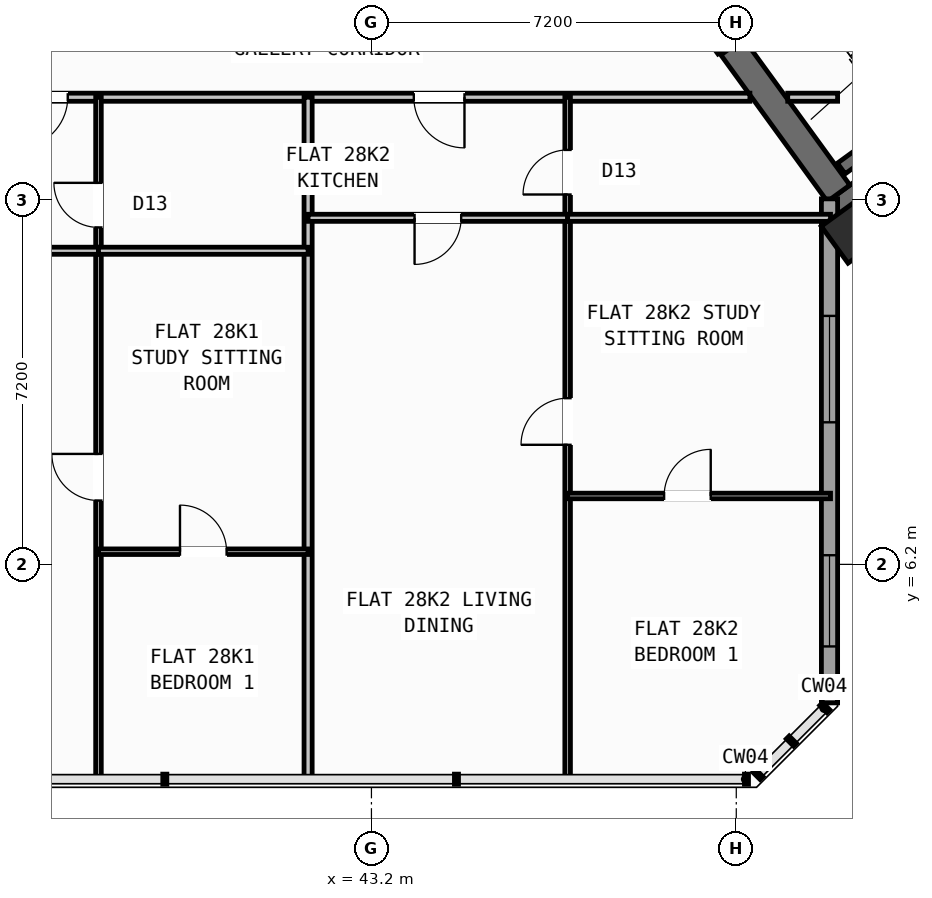
"""IFC4 building model, lengths in metres.
Left out: names, types, materials, properties, quantities, classifications, styles, units other than length and angle.
Written with IfcOpenShell. Run it as: python <this file> out.ifc"""

import sys

from ifc_helpers import new_model, si_unit, direction, frame, frame_2d, origin, origin_2d, place, context, subcontext, project, spatial, rectangle, hollow_rectangle, extrude, source, transform, mapped, element, fill, save


model = new_model("IFC4")
c1 = context("Model", 3, precision=1e-05, world=origin(), true_north=direction((0.0, 1.0)))
c2 = subcontext(c1, "Body", "Model", "MODEL_VIEW")
j1 = project(units=[si_unit("LENGTHUNIT", "METRE"), si_unit("PLANEANGLEUNIT", "RADIAN")], contexts=[c1])
p1 = place(None, origin())
s1 = spatial("IfcSite", under=j1, at=p1, CompositionType="ELEMENT")
p2 = place(p1, origin())
s2 = spatial("IfcBuilding", under=s1, at=p2, CompositionType="ELEMENT")
p3 = place(p2, frame((0.0, 0.0, 112.5)))
s3 = spatial("IfcBuildingStorey", under=s2, at=p3, CompositionType="ELEMENT", Elevation=112.5)
p4 = place(p3, frame((36.683, 18.304, 0.0), z_axis=(0.0, 0.0, 1.0), x_axis=(-0.529896466841, -0.848062341122, 0.0)))
e1 = element("IfcWall", 1, at=p4, inside=s3, PredefinedType="SHEAR", context=c2, shape_type="SweptSolid", body=[
    extrude(rectangle(XDim=6.425, YDim=0.55, at=frame_2d((3.212, 0.0))), origin(), (0.0, 0.0, 1.0), 3.35),
])
p5 = place(p3, frame((52.359, 13.14, 0.0), z_axis=(0.0, 0.0, 1.0), x_axis=(0.809014896919, 0.587788139183, 0.0)))
e2 = element("IfcWall", 2, at=p5, inside=s3, PredefinedType="SHEAR", context=c2, shape_type="SweptSolid", body=[
    extrude(rectangle(XDim=12.34, YDim=0.55, at=frame_2d((6.17, 0.0))), origin(), (0.0, 0.0, 1.0), 3.35),
])
p6 = place(p3, frame((52.42, 13.524, 0.0), z_axis=(0.0, 0.0, 1.0), x_axis=(-0.587802113096, 0.809004744015, 0.0)))
e3 = element("IfcWall", 3, at=p6, inside=s3, PredefinedType="SHEAR", context=c2, shape_type="SweptSolid", body=[
    extrude(rectangle(XDim=3.575, YDim=0.55, at=frame_2d((1.788, 0.0))), origin(), (0.0, 0.0, 1.0), 3.35),
])
m1 = source(origin(), c2, "Body", "SweptSolid", [
    extrude(hollow_rectangle(XDim=0.9, YDim=0.9, WallThickness=0.036, at=origin_2d()), origin(), (0.0, 0.0, 1.0), 3.6),
])
p7 = place(p3, frame((52.705, 12.773, 0.0), z_axis=(0.0, 0.0, 1.0), x_axis=(0.809016994375, 0.587785252292, 0.0)))
e4 = element("IfcColumn", 4, at=p7, inside=s3, PredefinedType="COLUMN", context=c2, shape_type="MappedRepresentation", body=[
    mapped(m1, transform((0.0, 0.0, 0.0), scale=1.0)),
])
p8 = place(p3, frame((52.24, 13.414, 0.0), z_axis=(0.0, 0.0, 1.0), x_axis=(0.0, -1.0, 0.0)))
e5 = element("IfcWall", 5, at=p8, inside=s3, PredefinedType="STANDARD", context=c2, shape_type="SweptSolid", body=[
    extrude(rectangle(XDim=9.948, YDim=0.32, at=frame_2d((4.974, 0.0))), origin(), (0.0, 0.0, 1.0), 3.35),
])
p9 = place(p8, frame((2.31, 0.0, 0.8)))
e6 = element("IfcOpeningElement", 6, at=p9, cuts=e5, PredefinedType="OPENING", context=c2, shape_type="SweptSolid", body=[
    extrude(rectangle(XDim=2.1, YDim=1.55, at=frame_2d((1.05, 0.775))), frame((0.0, 0.17, 0.0), z_axis=(0.0, -1.0, 0.0), x_axis=(1.0, 0.0, 0.0)), (0.0, 0.0, 1.0), 0.34),
])
p10 = place(p8, frame((7.033, 0.0, 0.85)))
e7 = element("IfcOpeningElement", 7, at=p10, cuts=e5, PredefinedType="OPENING", context=c2, shape_type="SweptSolid", body=[
    extrude(rectangle(XDim=1.8, YDim=1.5, at=frame_2d((0.9, 0.75))), frame((0.0, 0.17, 0.0), z_axis=(0.0, -1.0, 0.0), x_axis=(1.0, 0.0, 0.0)), (0.0, 0.0, 1.0), 0.34),
])
p11 = place(p3, frame((52.472, 14.013, 0.0), z_axis=(0.0, 0.0, 1.0), x_axis=(0.809028366311, 0.587769599847, 0.0)))
e8 = element("IfcWall", 8, at=p11, inside=s3, PredefinedType="SHEAR", context=c2, shape_type="SweptSolid", body=[
    extrude(rectangle(XDim=7.33, YDim=0.26, at=frame_2d((3.665, 0.0))), origin(), (0.0, 0.0, 1.0), 3.35),
])
p12 = place(p3, frame((35.237, 15.42, 0.0), z_axis=(0.0, 0.0, 1.0), x_axis=(1.0, 0.0, 0.0)))
e9 = element("IfcWall", 9, at=p12, inside=s3, PredefinedType="PARTITIONING", context=c2, shape_type="SweptSolid", body=[
    extrude(rectangle(XDim=15.432, YDim=0.16, at=frame_2d((7.716, 0.0))), origin(), (0.0, 0.0, 1.0), 3.34),
])
p13 = place(p12, frame((0.969, 0.0, 0.0)))
e10 = element("IfcOpeningElement", 10, at=p13, cuts=e9, PredefinedType="OPENING", context=c2, shape_type="SweptSolid", body=[
    extrude(rectangle(XDim=1.0, YDim=2.1, at=frame_2d((0.5, 1.05))), frame((0.0, 0.09, 0.0), z_axis=(0.0, -1.0, 0.0), x_axis=(1.0, 0.0, 0.0)), (0.0, 0.0, 1.0), 0.18),
])
p14 = place(p12, frame((8.799, 0.0, 0.0)))
e11 = element("IfcOpeningElement", 11, at=p14, cuts=e9, PredefinedType="OPENING", context=c2, shape_type="SweptSolid", body=[
    extrude(rectangle(XDim=1.0, YDim=2.1, at=frame_2d((0.5, 1.05))), frame((0.0, 0.09, 0.0), z_axis=(0.0, -1.0, 0.0), x_axis=(1.0, 0.0, 0.0)), (0.0, 0.0, 1.0), 0.18),
])
p15 = place(p3, frame((51.416, 15.42, 0.0), z_axis=(0.0, 0.0, 1.0), x_axis=(1.0, 0.0, 0.0)))
e12 = element("IfcWall", 12, at=p15, inside=s3, PredefinedType="PARTITIONING", context=c2, shape_type="SweptSolid", body=[
    extrude(rectangle(XDim=0.984, YDim=0.16, at=frame_2d((0.492, 0.0))), origin(), (0.0, 0.0, 1.0), 3.34),
])
p16 = place(p3, frame((50.119, 16.333, 0.0), z_axis=(0.0, 0.0, 1.0), x_axis=(-0.587749856981, 0.809042709391, 0.0)))
e13 = element("IfcWall", 13, at=p16, inside=s3, PredefinedType="STANDARD", context=c2, shape_type="SweptSolid", body=[
    extrude(rectangle(XDim=2.96, YDim=0.2, at=frame_2d((1.48, 0.0))), origin(), (0.0, 0.0, 1.0), 3.34),
])
p17 = place(p16, frame((0.53, 0.0, 0.0)))
e14 = element("IfcOpeningElement", 14, at=p17, cuts=e13, PredefinedType="OPENING", context=c2, shape_type="SweptSolid", body=[
    extrude(rectangle(XDim=1.5, YDim=2.15, at=frame_2d((0.75, 1.075))), frame((0.0, 0.11, 0.0), z_axis=(0.0, -1.0, 0.0), x_axis=(1.0, 0.0, 0.0)), (0.0, 0.0, 1.0), 0.22),
])
p18 = place(p3, frame((41.95, 1.96, 0.0), z_axis=(0.0, 0.0, 1.0), x_axis=(0.0, 1.0, 0.0)))
e15 = element("IfcWall", 15, at=p18, inside=s3, PredefinedType="PARTITIONING", context=c2, shape_type="SweptSolid", body=[
    extrude(rectangle(XDim=13.46, YDim=0.16, at=frame_2d((6.73, 0.0))), origin(), (0.0, 0.0, 1.0), 3.34),
])
p19 = place(p3, frame((37.813, 1.96, 0.0), z_axis=(0.0, 0.0, 1.0), x_axis=(0.0, 1.0, 0.0)))
e16 = element("IfcWall", 16, at=p19, inside=s3, PredefinedType="PARTITIONING", context=c2, shape_type="SweptSolid", body=[
    extrude(rectangle(XDim=13.46, YDim=0.11, at=frame_2d((6.73, 0.0))), origin(), (0.0, 0.0, 1.0), 3.34),
])
p20 = place(p19, frame((5.5, 0.0, 0.0)))
e17 = element("IfcOpeningElement", 17, at=p20, cuts=e16, PredefinedType="OPENING", context=c2, shape_type="SweptSolid", body=[
    extrude(rectangle(XDim=0.92, YDim=2.08, at=frame_2d((0.46, 1.04))), frame((0.0, 0.065, 0.0), z_axis=(0.0, -1.0, 0.0), x_axis=(1.0, 0.0, 0.0)), (0.0, 0.0, 1.0), 0.13),
])
p21 = place(p19, frame((10.89, 0.0, 0.0)))
e18 = element("IfcOpeningElement", 18, at=p21, cuts=e16, PredefinedType="OPENING", context=c2, shape_type="SweptSolid", body=[
    extrude(rectangle(XDim=0.88, YDim=2.08, at=frame_2d((0.44, 1.04))), frame((0.0, 0.065, 0.0), z_axis=(0.0, -1.0, 0.0), x_axis=(1.0, 0.0, 0.0)), (0.0, 0.0, 1.0), 0.13),
])
p22 = place(p3, frame((33.433, 12.39, 0.0), z_axis=(0.0, 0.0, 1.0), x_axis=(1.0, 0.0, 0.0)))
e19 = element("IfcWall", 19, at=p22, inside=s3, PredefinedType="PLUMBINGWALL", context=c2, shape_type="SweptSolid", body=[
    extrude(rectangle(XDim=4.38, YDim=0.14, at=frame_2d((2.19, 0.0))), origin(), (0.0, 0.0, 1.0), 2.525),
])
p23 = place(p22, frame((1.064, 0.0, 0.0)))
e20 = element("IfcOpeningElement", 20, at=p23, cuts=e19, PredefinedType="OPENING", context=c2, shape_type="SweptSolid", body=[
    extrude(rectangle(XDim=0.92, YDim=2.08, at=frame_2d((0.46, 1.04))), frame((0.0, 0.08, 0.0), z_axis=(0.0, -1.0, 0.0), x_axis=(1.0, 0.0, 0.0)), (0.0, 0.0, 1.0), 0.16),
])
p24 = place(p3, frame((37.813, 12.39, 0.0), z_axis=(0.0, 0.0, 1.0), x_axis=(1.0, 0.0, 0.0)))
e21 = element("IfcWall", 21, at=p24, inside=s3, PredefinedType="PLUMBINGWALL", context=c2, shape_type="SweptSolid", body=[
    extrude(rectangle(XDim=4.137, YDim=0.14, at=frame_2d((2.068, 0.0))), origin(), (0.0, 0.0, 1.0), 2.525),
])
p25 = place(p3, frame((37.813, 6.45, 0.0), z_axis=(0.0, 0.0, 1.0), x_axis=(1.0, 0.0, 0.0)))
e22 = element("IfcWall", 22, at=p25, inside=s3, PredefinedType="PARTITIONING", context=c2, shape_type="SweptSolid", body=[
    extrude(rectangle(XDim=4.137, YDim=0.11, at=frame_2d((2.068, 0.0))), origin(), (0.0, 0.0, 1.0), 3.34),
])
p26 = place(p25, frame((1.608, 0.0, 0.0)))
e23 = element("IfcOpeningElement", 23, at=p26, cuts=e22, PredefinedType="OPENING", context=c2, shape_type="SweptSolid", body=[
    extrude(rectangle(XDim=0.92, YDim=2.08, at=frame_2d((0.46, 1.04))), frame((0.0, 0.065, 0.0), z_axis=(0.0, -1.0, 0.0), x_axis=(1.0, 0.0, 0.0)), (0.0, 0.0, 1.0), 0.13),
])
p27 = place(p3, frame((47.072, 1.96, 0.0), z_axis=(0.0, 0.0, 1.0), x_axis=(0.0, 1.0, 0.0)))
e24 = element("IfcWall", 24, at=p27, inside=s3, PredefinedType="PARTITIONING", context=c2, shape_type="SweptSolid", body=[
    extrude(rectangle(XDim=13.46, YDim=0.11, at=frame_2d((6.73, 0.0))), origin(), (0.0, 0.0, 1.0), 3.34),
])
p28 = place(p27, frame((6.6, 0.0, 0.0)))
e25 = element("IfcOpeningElement", 25, at=p28, cuts=e24, PredefinedType="OPENING", context=c2, shape_type="SweptSolid", body=[
    extrude(rectangle(XDim=0.92, YDim=2.08, at=frame_2d((0.46, 1.04))), frame((0.0, 0.065, 0.0), z_axis=(0.0, -1.0, 0.0), x_axis=(1.0, 0.0, 0.0)), (0.0, 0.0, 1.0), 0.13),
])
p29 = place(p27, frame((11.54, 0.0, 0.0)))
e26 = element("IfcOpeningElement", 26, at=p29, cuts=e24, PredefinedType="OPENING", context=c2, shape_type="SweptSolid", body=[
    extrude(rectangle(XDim=0.88, YDim=2.08, at=frame_2d((0.44, 1.04))), frame((0.0, 0.065, 0.0), z_axis=(0.0, -1.0, 0.0), x_axis=(1.0, 0.0, 0.0)), (0.0, 0.0, 1.0), 0.13),
])
p30 = place(p3, frame((41.95, 13.04, 0.0), z_axis=(0.0, 0.0, 1.0), x_axis=(1.0, 0.0, 0.0)))
e27 = element("IfcWall", 27, at=p30, inside=s3, PredefinedType="PLUMBINGWALL", context=c2, shape_type="SweptSolid", body=[
    extrude(rectangle(XDim=5.122, YDim=0.14, at=frame_2d((2.561, 0.0))), origin(), (0.0, 0.0, 1.0), 3.34),
])
p31 = place(p30, frame((2.101, 0.0, 0.0)))
e28 = element("IfcOpeningElement", 28, at=p31, cuts=e27, PredefinedType="OPENING", context=c2, shape_type="SweptSolid", body=[
    extrude(rectangle(XDim=0.92, YDim=2.08, at=frame_2d((0.46, 1.04))), frame((0.0, 0.08, 0.0), z_axis=(0.0, -1.0, 0.0), x_axis=(1.0, 0.0, 0.0)), (0.0, 0.0, 1.0), 0.16),
])
p32 = place(p3, frame((47.072, 13.04, 0.0), z_axis=(0.0, 0.0, 1.0), x_axis=(1.0, 0.0, 0.0)))
e29 = element("IfcWall", 29, at=p32, inside=s3, PredefinedType="PLUMBINGWALL", context=c2, shape_type="SweptSolid", body=[
    extrude(rectangle(XDim=5.188, YDim=0.14, at=frame_2d((2.594, 0.0))), origin(), (0.0, 0.0, 1.0), 2.525),
])
p33 = place(p3, frame((47.072, 7.55, 0.0), z_axis=(0.0, 0.0, 1.0), x_axis=(1.0, 0.0, 0.0)))
e30 = element("IfcWall", 30, at=p33, inside=s3, PredefinedType="PARTITIONING", context=c2, shape_type="SweptSolid", body=[
    extrude(rectangle(XDim=5.188, YDim=0.11, at=frame_2d((2.594, 0.0))), origin(), (0.0, 0.0, 1.0), 3.34),
])
p34 = place(p33, frame((1.904, 0.0, 0.0)))
e31 = element("IfcOpeningElement", 31, at=p34, cuts=e30, PredefinedType="OPENING", context=c2, shape_type="SweptSolid", body=[
    extrude(rectangle(XDim=0.92, YDim=2.08, at=frame_2d((0.46, 1.04))), frame((0.0, 0.065, 0.0), z_axis=(0.0, -1.0, 0.0), x_axis=(1.0, 0.0, 0.0)), (0.0, 0.0, 1.0), 0.13),
])
m2 = source(origin(), c2, "Body", "SweptSolid", [
    extrude(rectangle(XDim=2.1, YDim=1.55, at=frame_2d((1.05, 0.775))), frame((0.0, 0.03, 0.0), z_axis=(0.0, -1.0, 0.0), x_axis=(1.0, 0.0, 0.0)), (0.0, 0.0, 1.0), 0.06),
])
p35 = place(p9, origin())
e32 = element("IfcWindow", 32, at=p35, inside=s3, PartitioningType="SINGLE_PANEL", PredefinedType="WINDOW", context=c2, shape_type="MappedRepresentation", body=[
    mapped(m2, transform((0.0, 0.0, 0.0), scale=1.0)),
])
fill(e6, e32)
m3 = source(origin(), c2, "Body", "SweptSolid", [
    extrude(rectangle(XDim=1.8, YDim=1.5, at=frame_2d((0.9, 0.75))), frame((0.0, 0.03, 0.0), z_axis=(0.0, -1.0, 0.0), x_axis=(1.0, 0.0, 0.0)), (0.0, 0.0, 1.0), 0.06),
])
p36 = place(p10, origin())
e33 = element("IfcWindow", 33, at=p36, inside=s3, PartitioningType="SINGLE_PANEL", PredefinedType="WINDOW", context=c2, shape_type="MappedRepresentation", body=[
    mapped(m3, transform((0.0, 0.0, 0.0), scale=1.0)),
])
fill(e7, e33)
m4 = source(origin(), c2, "Body", "SweptSolid", [
    extrude(rectangle(XDim=0.92, YDim=2.08, at=frame_2d((0.46, 1.04))), frame((0.0, 0.025, 0.0), z_axis=(0.0, -1.0, 0.0), x_axis=(1.0, 0.0, 0.0)), (0.0, 0.0, 1.0), 0.05),
])
p37 = place(p20, origin())
e34 = element("IfcDoor", 34, at=p37, inside=s3, OperationType="SINGLE_SWING_RIGHT", PredefinedType="DOOR", context=c2, shape_type="MappedRepresentation", body=[
    mapped(m4, transform((0.0, 0.0, 0.0), scale=1.0)),
])
fill(e17, e34)
p38 = place(p26, origin())
e35 = element("IfcDoor", 35, at=p38, inside=s3, OperationType="SINGLE_SWING_LEFT", PredefinedType="DOOR", context=c2, shape_type="MappedRepresentation", body=[
    mapped(m4, transform((0.0, 0.0, 0.0), scale=1.0)),
])
fill(e23, e35)
m5 = source(origin(), c2, "Body", "SweptSolid", [
    extrude(rectangle(XDim=1.0, YDim=2.1, at=frame_2d((0.5, 1.05))), frame((0.0, 0.025, 0.0), z_axis=(0.0, -1.0, 0.0), x_axis=(1.0, 0.0, 0.0)), (0.0, 0.0, 1.0), 0.05),
])
p39 = place(p13, frame((1.0, 0.0, 0.0), z_axis=(0.0, 0.0, 1.0), x_axis=(-1.0, 0.0, 0.0)))
e36 = element("IfcDoor", 36, at=p39, inside=s3, OperationType="SINGLE_SWING_RIGHT", PredefinedType="DOOR", context=c2, shape_type="MappedRepresentation", body=[
    mapped(m5, transform((0.0, 0.0, 0.0), scale=1.0)),
])
fill(e10, e36)
m6 = source(origin(), c2, "Body", "SweptSolid", [
    extrude(rectangle(XDim=0.88, YDim=2.08, at=frame_2d((0.44, 1.04))), frame((0.0, 0.025, 0.0), z_axis=(0.0, -1.0, 0.0), x_axis=(1.0, 0.0, 0.0)), (0.0, 0.0, 1.0), 0.05),
])
p40 = place(p21, origin())
e37 = element("IfcDoor", 37, at=p40, inside=s3, OperationType="SINGLE_SWING_RIGHT", PredefinedType="DOOR", context=c2, shape_type="MappedRepresentation", body=[
    mapped(m6, transform((0.0, 0.0, 0.0), scale=1.0)),
])
fill(e18, e37)
p41 = place(p28, origin())
e38 = element("IfcDoor", 38, at=p41, inside=s3, OperationType="SINGLE_SWING_LEFT", PredefinedType="DOOR", context=c2, shape_type="MappedRepresentation", body=[
    mapped(m4, transform((0.0, 0.0, 0.0), scale=1.0)),
])
fill(e25, e38)
p42 = place(p34, origin())
e39 = element("IfcDoor", 39, at=p42, inside=s3, OperationType="SINGLE_SWING_RIGHT", PredefinedType="DOOR", context=c2, shape_type="MappedRepresentation", body=[
    mapped(m4, transform((0.0, 0.0, 0.0), scale=1.0)),
])
fill(e31, e39)
p43 = place(p14, frame((1.0, 0.0, 0.0), z_axis=(0.0, 0.0, 1.0), x_axis=(-1.0, 0.0, 0.0)))
e40 = element("IfcDoor", 40, at=p43, inside=s3, OperationType="SINGLE_SWING_LEFT", PredefinedType="DOOR", context=c2, shape_type="MappedRepresentation", body=[
    mapped(m5, transform((0.0, 0.0, 0.0), scale=1.0)),
])
fill(e11, e40)
p44 = place(p31, frame((0.92, 0.0, 0.0), z_axis=(0.0, 0.0, 1.0), x_axis=(-1.0, 0.0, 0.0)))
e41 = element("IfcDoor", 41, at=p44, inside=s3, OperationType="SINGLE_SWING_RIGHT", PredefinedType="DOOR", context=c2, shape_type="MappedRepresentation", body=[
    mapped(m4, transform((0.0, 0.0, 0.0), scale=1.0)),
])
fill(e28, e41)
p45 = place(p29, origin())
e42 = element("IfcDoor", 42, at=p45, inside=s3, OperationType="SINGLE_SWING_LEFT", PredefinedType="DOOR", context=c2, shape_type="MappedRepresentation", body=[
    mapped(m6, transform((0.0, 0.0, 0.0), scale=1.0)),
])
fill(e26, e42)
save(model, sys.argv[1])
